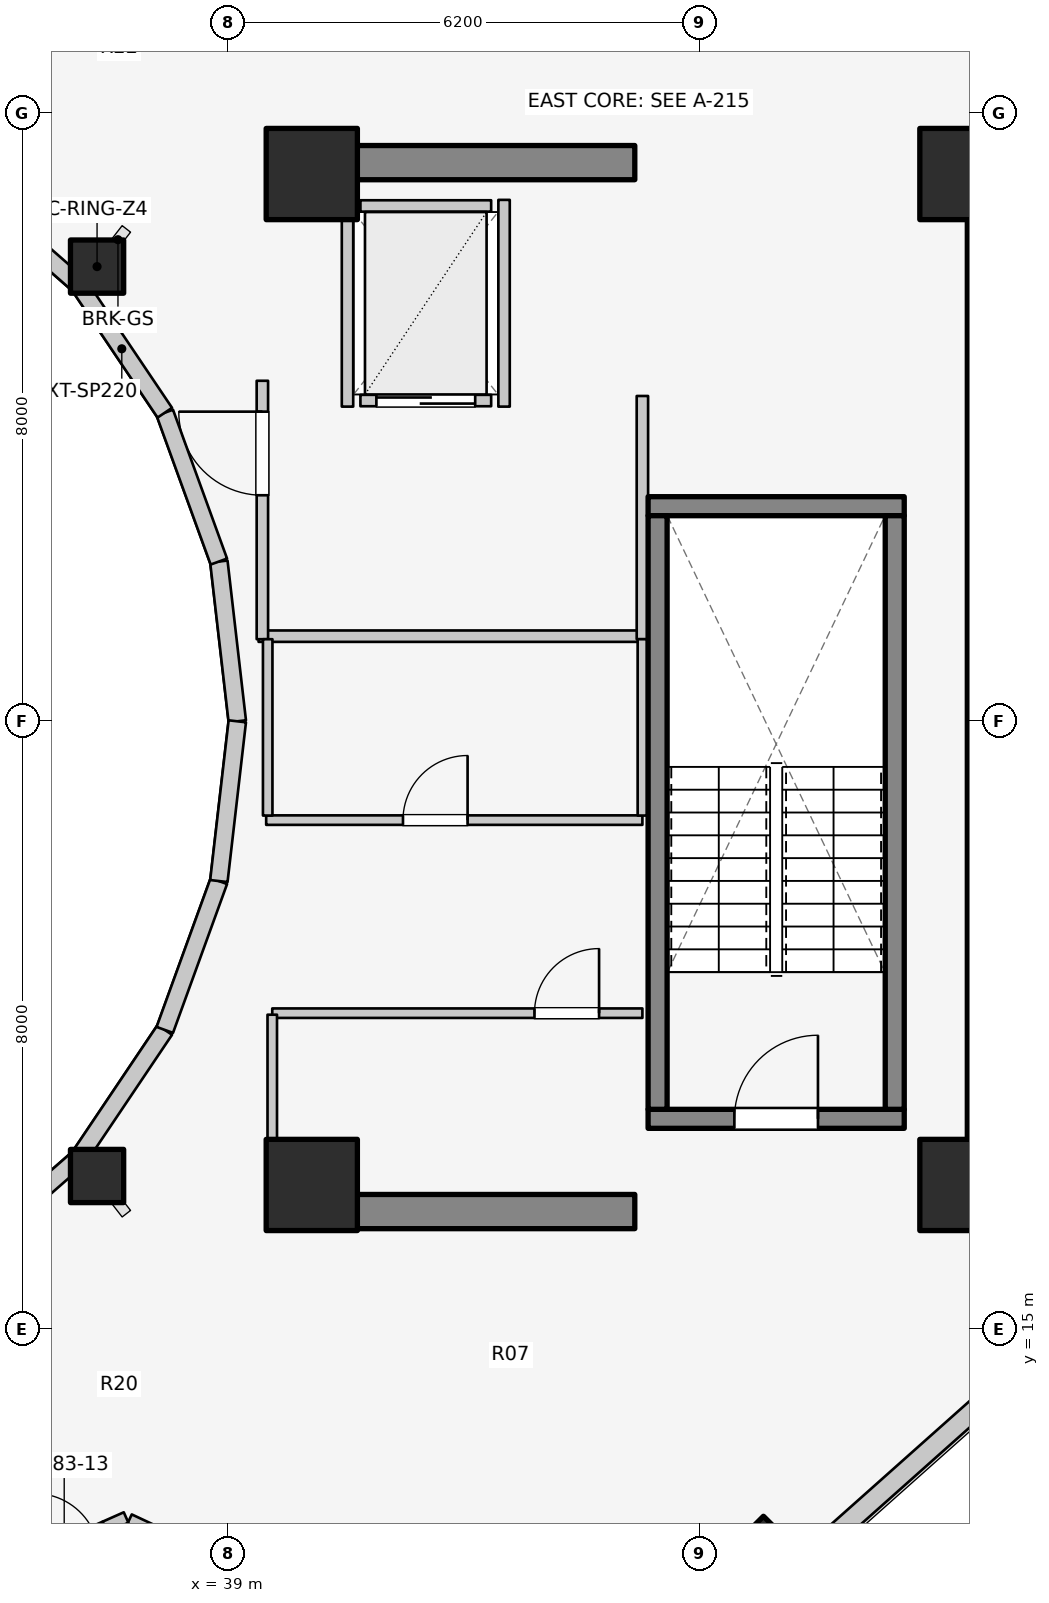
"""IFC4 building model, lengths in metres.
Left out: names, types, materials, properties, quantities, classifications, styles, units other than length and angle.
Written with IfcOpenShell. Run it as: python <this file> out.ifc"""

import sys

from ifc_helpers import new_model, si_unit, direction, frame, frame_2d, origin, origin_2d, place, context, subcontext, project, spatial, rectangle, i_section, extrude, element, fill, save


model = new_model("IFC4")
c1 = context("Model", 3, precision=1e-05, world=origin(), true_north=direction((0.0, 1.0)))
c2 = subcontext(c1, "Body", "Model", "MODEL_VIEW")
j1 = project(units=[si_unit("LENGTHUNIT", "METRE"), si_unit("PLANEANGLEUNIT", "RADIAN")], contexts=[c1])
p1 = place(None, origin())
s1 = spatial("IfcSite", under=j1, at=p1, CompositionType="ELEMENT")
p2 = place(p1, origin())
s2 = spatial("IfcBuilding", under=s1, at=p2, CompositionType="ELEMENT")
p3 = place(p2, frame((0.0, 0.0, 273.2)))
s3 = spatial("IfcBuildingStorey", under=s2, at=p3, CompositionType="ELEMENT", Elevation=273.2)
p4 = place(p3, frame((48.95, 17.05, 0.0), z_axis=(0.0, 0.0, 1.0), x_axis=(0.0, 1.0, 0.0)))
e1 = element("IfcWall", 1, at=p4, inside=s3, PredefinedType="SHEAR", context=c2, shape_type="SweptSolid", body=[
    extrude(rectangle(XDim=12.8, YDim=0.45, at=frame_2d((6.4, 0.0))), origin(), (0.0, 0.0, 1.0), 3.2),
])
for number, where, z_axis, x_axis in (
    (2, (39.85, 16.55, 0.0), (0.0, 0.0, 1.0), (1.0, 0.0, 0.0)),
    (3, (39.85, 30.35, 0.0), (0.0, 0.0, 1.0), (1.0, 0.0, 0.0)),
):
    element("IfcWall", number, at=place(p3, frame(where, z_axis=z_axis, x_axis=x_axis)), inside=s3, PredefinedType="SHEAR", context=c2, shape_type="SweptSolid", body=[
        extrude(rectangle(XDim=4.5, YDim=0.45, at=frame_2d((2.25, 0.0))), origin(), (0.0, 0.0, 1.0), 3.2),
    ])
p5 = place(p3, frame((44.525, 17.77, 0.0), z_axis=(0.0, 0.0, 1.0), x_axis=(1.0, 0.0, 0.0)))
e4 = element("IfcWall", 4, at=p5, inside=s3, PredefinedType="SOLIDWALL", context=c2, shape_type="SweptSolid", body=[
    extrude(rectangle(XDim=3.37, YDim=0.25, at=frame_2d((1.685, 0.0))), origin(), (0.0, 0.0, 1.0), 3.2),
])
p6 = place(p5, frame((1.135, 0.0, 0.0)))
e5 = element("IfcOpeningElement", 5, at=p6, cuts=e4, PredefinedType="OPENING", context=c2, shape_type="SweptSolid", body=[
    extrude(rectangle(XDim=1.1, YDim=2.1, at=frame_2d((0.55, 1.05))), frame((0.0, 0.135, 0.0), z_axis=(0.0, -1.0, 0.0), x_axis=(1.0, 0.0, 0.0)), (0.0, 0.0, 1.0), 0.27),
])
p7 = place(p3, frame((44.525, 25.83, 0.0), z_axis=(0.0, 0.0, 1.0), x_axis=(1.0, 0.0, 0.0)))
e6 = element("IfcWall", 6, at=p7, inside=s3, PredefinedType="SOLIDWALL", context=c2, shape_type="SweptSolid", body=[
    extrude(rectangle(XDim=3.37, YDim=0.25, at=frame_2d((1.685, 0.0))), origin(), (0.0, 0.0, 1.0), 3.2),
])
for number, where, z_axis, x_axis in (
    (7, (44.65, 17.895, 0.0), (0.0, 0.0, 1.0), (0.0, 1.0, 0.0)),
    (8, (47.77, 17.895, 0.0), (0.0, 0.0, 1.0), (0.0, 1.0, 0.0)),
):
    element("IfcWall", number, at=place(p3, frame(where, z_axis=z_axis, x_axis=x_axis)), inside=s3, PredefinedType="SOLIDWALL", context=c2, shape_type="SweptSolid", body=[
        extrude(rectangle(XDim=7.81, YDim=0.25, at=frame_2d((3.905, 0.0))), origin(), (0.0, 0.0, 1.0), 3.2),
    ])
for number, where, z_axis, x_axis in (
    (9, (40.1, 16.9, 0.0), (0.0, 0.0, 1.0), (1.0, 0.0, 0.0)),
    (10, (48.7, 16.9, 0.0), (0.0, 0.0, 1.0), (1.0, 0.0, 0.0)),
    (11, (48.7, 30.2, 0.0), (0.0, 0.0, 1.0), (1.0, 0.0, 0.0)),
    (12, (40.1, 30.2, 0.0), (0.0, 0.0, 1.0), (1.0, 0.0, 0.0)),
):
    element("IfcColumn", number, at=place(p3, frame(where, z_axis=z_axis, x_axis=x_axis)), inside=s3, PredefinedType="COLUMN", context=c2, shape_type="SweptSolid", body=[
        extrude(rectangle(XDim=1.2, YDim=1.2, at=origin_2d()), origin(), (0.0, 0.0, 1.0), 3.2),
    ])
for number, where, z_axis, x_axis in (
    (13, (37.275, 28.982, 0.0), (0.0, 0.0, 1.0), (1.0, 0.0, 0.0)),
    (14, (37.275, 17.018, 0.0), (0.0, 0.0, 1.0), (1.0, 0.0, 0.0)),
):
    element("IfcColumn", number, at=place(p3, frame(where, z_axis=z_axis, x_axis=x_axis)), inside=s3, PredefinedType="COLUMN", context=c2, shape_type="SweptSolid", body=[
        extrude(rectangle(XDim=0.7, YDim=0.7, at=origin_2d()), origin(), (0.0, 0.0, 1.0), 3.2),
    ])
p8 = place(p3, frame((46.035, 12.242, 0.0), z_axis=(0.0, 0.0, 1.0), x_axis=(0.707106781187, -0.707106781187, 0.0)))
e15 = element("IfcColumn", 15, at=p8, inside=s3, PredefinedType="COLUMN", context=c2, shape_type="SweptSolid", body=[
    extrude(i_section(OverallWidth=0.412, OverallDepth=0.435, WebThickness=0.036, FlangeThickness=0.057, FilletRadius=0.025, at=origin_2d()), origin(), (0.0, 0.0, 1.0), 3.2),
])
p9 = place(p3, frame((39.12, 23.0, 0.0), z_axis=(0.0, 0.0, 1.0), x_axis=(-0.114711713601, 0.993398823617, 0.0)))
e16 = element("IfcWall", 16, at=p9, inside=s3, PredefinedType="STANDARD", context=c2, shape_type="SweptSolid", body=[
    extrude(rectangle(XDim=2.115, YDim=0.23, at=frame_2d((1.058, 0.0))), origin(), (0.0, 0.0, 1.0), 2.9),
])
p10 = place(p3, frame((38.877, 25.102, 0.0), z_axis=(0.0, 0.0, 1.0), x_axis=(-0.341423187295, 0.93990968033, 0.0)))
e17 = element("IfcWall", 17, at=p10, inside=s3, PredefinedType="STANDARD", context=c2, shape_type="SweptSolid", body=[
    extrude(rectangle(XDim=2.084, YDim=0.23, at=frame_2d((1.042, 0.0))), origin(), (0.0, 0.0, 1.0), 2.9),
])
p11 = place(p3, frame((38.166, 27.06, 0.0), z_axis=(0.0, 0.0, 1.0), x_axis=(-0.558197800898, 0.829707909492, 0.0)))
e18 = element("IfcWall", 18, at=p11, inside=s3, PredefinedType="STANDARD", context=c2, shape_type="SweptSolid", body=[
    extrude(rectangle(XDim=2.027, YDim=0.23, at=frame_2d((1.013, 0.0))), origin(), (0.0, 0.0, 1.0), 1.32),
])
for number, where, z_axis, x_axis in (
    (19, (37.035, 28.742, 0.0), (0.0, 0.0, 1.0), (-0.753, 0.659, 0.0)),
    (20, (35.56, 15.968, 0.0), (0.0, 0.0, 1.0), (0.753, 0.659, 0.0)),
):
    element("IfcWall", number, at=place(p3, frame(where, z_axis=z_axis, x_axis=x_axis)), inside=s3, PredefinedType="STANDARD", context=c2, shape_type="SweptSolid", body=[
        extrude(rectangle(XDim=1.959, YDim=0.23, at=frame_2d((0.98, 0.0))), origin(), (0.0, 0.0, 1.0), 1.32),
    ])
p12 = place(p3, frame((37.035, 17.258, 0.0), z_axis=(0.0, 0.0, 1.0), x_axis=(0.558197800898, 0.829707909492, 0.0)))
e21 = element("IfcWall", 21, at=p12, inside=s3, PredefinedType="STANDARD", context=c2, shape_type="SweptSolid", body=[
    extrude(rectangle(XDim=2.027, YDim=0.23, at=frame_2d((1.013, 0.0))), origin(), (0.0, 0.0, 1.0), 1.32),
])
p13 = place(p3, frame((38.166, 18.94, 0.0), z_axis=(0.0, 0.0, 1.0), x_axis=(0.341423187295, 0.93990968033, 0.0)))
e22 = element("IfcWall", 22, at=p13, inside=s3, PredefinedType="STANDARD", context=c2, shape_type="SweptSolid", body=[
    extrude(rectangle(XDim=2.084, YDim=0.23, at=frame_2d((1.042, 0.0))), origin(), (0.0, 0.0, 1.0), 2.9),
])
p14 = place(p3, frame((38.877, 20.898, 0.0), z_axis=(0.0, 0.0, 1.0), x_axis=(0.114711713601, 0.993398823617, 0.0)))
e23 = element("IfcWall", 23, at=p14, inside=s3, PredefinedType="STANDARD", context=c2, shape_type="SweptSolid", body=[
    extrude(rectangle(XDim=2.115, YDim=0.23, at=frame_2d((1.058, 0.0))), origin(), (0.0, 0.0, 1.0), 2.9),
])
p15 = place(p3, frame((46.448, 11.829, 0.0), z_axis=(0.0, 0.0, 1.0), x_axis=(0.746928837667, 0.664903986649, 0.0)))
e24 = element("IfcWall", 24, at=p15, inside=s3, PredefinedType="STANDARD", context=c2, shape_type="SweptSolid", body=[
    extrude(rectangle(XDim=3.982, YDim=0.26, at=frame_2d((1.991, 0.0))), origin(), (0.0, 0.0, 1.0), 1.32),
])
p16 = place(p3, frame((40.74, 27.22, 0.0), z_axis=(0.0, 0.0, 1.0), x_axis=(1.0, 0.0, 0.0)))
e25 = element("IfcWall", 25, at=p16, inside=s3, PredefinedType="SOLIDWALL", context=c2, shape_type="SweptSolid", body=[
    extrude(rectangle(XDim=1.72, YDim=0.15, at=frame_2d((0.86, 0.0))), origin(), (0.0, 0.0, 1.0), 2.915),
])
p17 = place(p16, frame((0.21, 0.0, 0.0)))
e26 = element("IfcOpeningElement", 26, at=p17, cuts=e25, PredefinedType="OPENING", context=c2, shape_type="SweptSolid", body=[
    extrude(rectangle(XDim=1.3, YDim=2.1, at=frame_2d((0.65, 1.05))), frame((0.0, 0.085, 0.0), z_axis=(0.0, -1.0, 0.0), x_axis=(1.0, 0.0, 0.0)), (0.0, 0.0, 1.0), 0.17),
])
p18 = place(p3, frame((40.74, 29.78, 0.0), z_axis=(0.0, 0.0, 1.0), x_axis=(1.0, 0.0, 0.0)))
e27 = element("IfcWall", 27, at=p18, inside=s3, PredefinedType="SOLIDWALL", context=c2, shape_type="SweptSolid", body=[
    extrude(rectangle(XDim=1.72, YDim=0.15, at=frame_2d((0.86, 0.0))), origin(), (0.0, 0.0, 1.0), 2.915),
])
for number, where, z_axis, x_axis in (
    (28, (40.57, 27.14, 0.0), (0.0, 0.0, 1.0), (0.0, 1.0, 0.0)),
    (29, (42.63, 27.14, 0.0), (0.0, 0.0, 1.0), (0.0, 1.0, 0.0)),
):
    element("IfcWall", number, at=place(p3, frame(where, z_axis=z_axis, x_axis=x_axis)), inside=s3, PredefinedType="SOLIDWALL", context=c2, shape_type="SweptSolid", body=[
        extrude(rectangle(XDim=2.72, YDim=0.15, at=frame_2d((1.36, 0.0))), origin(), (0.0, 0.0, 1.0), 2.915),
    ])
p19 = place(p3, frame((39.4, 24.12, 0.0), z_axis=(0.0, 0.0, 1.0), x_axis=(1.0, 0.0, 0.0)))
e30 = element("IfcWall", 30, at=p19, inside=s3, PredefinedType="PARTITIONING", context=c2, shape_type="SweptSolid", body=[
    extrude(rectangle(XDim=5.08, YDim=0.15, at=frame_2d((2.54, 0.0))), origin(), (0.0, 0.0, 1.0), 2.22),
])
p20 = place(p3, frame((44.45, 24.08, 0.0), z_axis=(0.0, 0.0, 1.0), x_axis=(0.0, 1.0, 0.0)))
e31 = element("IfcWall", 31, at=p20, inside=s3, PredefinedType="PARTITIONING", context=c2, shape_type="SweptSolid", body=[
    extrude(rectangle(XDim=3.2, YDim=0.15, at=frame_2d((1.6, 0.0))), origin(), (0.0, 0.0, 1.0), 2.915),
])
p21 = place(p3, frame((39.45, 24.08, 0.0), z_axis=(0.0, 0.0, 1.0), x_axis=(0.0, 1.0, 0.0)))
e32 = element("IfcWall", 32, at=p21, inside=s3, PredefinedType="PARTITIONING", context=c2, shape_type="SweptSolid", body=[
    extrude(rectangle(XDim=3.4, YDim=0.15, at=frame_2d((1.7, 0.0))), origin(), (0.0, 0.0, 1.0), 2.915),
])
p22 = place(p21, frame((1.894, 0.0, 0.0)))
e33 = element("IfcOpeningElement", 33, at=p22, cuts=e32, PredefinedType="OPENING", context=c2, shape_type="SweptSolid", body=[
    extrude(rectangle(XDim=1.1, YDim=2.1, at=frame_2d((0.55, 1.05))), frame((0.0, 0.085, 0.0), z_axis=(0.0, -1.0, 0.0), x_axis=(1.0, 0.0, 0.0)), (0.0, 0.0, 1.0), 0.17),
])
p23 = place(p3, frame((39.58, 19.16, 0.0), z_axis=(0.0, 0.0, 1.0), x_axis=(1.0, 0.0, 0.0)))
e34 = element("IfcWall", 34, at=p23, inside=s3, PredefinedType="PARTITIONING", context=c2, shape_type="SweptSolid", body=[
    extrude(rectangle(XDim=4.87, YDim=0.125, at=frame_2d((2.435, 0.0))), origin(), (0.0, 0.0, 1.0), 2.22),
])
p24 = place(p23, frame((3.45, 0.0, 0.0)))
e35 = element("IfcOpeningElement", 35, at=p24, cuts=e34, PredefinedType="OPENING", context=c2, shape_type="SweptSolid", body=[
    extrude(rectangle(XDim=0.85, YDim=2.05, at=frame_2d((0.425, 1.025))), frame((0.0, 0.073, 0.0), z_axis=(0.0, -1.0, 0.0), x_axis=(1.0, 0.0, 0.0)), (0.0, 0.0, 1.0), 0.145),
])
p25 = place(p3, frame((39.58, 17.1, 0.0), z_axis=(0.0, 0.0, 1.0), x_axis=(0.0, 1.0, 0.0)))
e36 = element("IfcWall", 36, at=p25, inside=s3, PredefinedType="PARTITIONING", context=c2, shape_type="SweptSolid", body=[
    extrude(rectangle(XDim=2.04, YDim=0.125, at=frame_2d((1.02, 0.0))), origin(), (0.0, 0.0, 1.0), 2.491),
])
p26 = place(p3, frame((39.5, 21.7, 0.0), z_axis=(0.0, 0.0, 1.0), x_axis=(1.0, 0.0, 0.0)))
e37 = element("IfcWall", 37, at=p26, inside=s3, PredefinedType="PARTITIONING", context=c2, shape_type="SweptSolid", body=[
    extrude(rectangle(XDim=4.95, YDim=0.125, at=frame_2d((2.475, 0.0))), origin(), (0.0, 0.0, 1.0), 2.22),
])
p27 = place(p26, frame((1.8, 0.0, 0.0)))
e38 = element("IfcOpeningElement", 38, at=p27, cuts=e37, PredefinedType="OPENING", context=c2, shape_type="SweptSolid", body=[
    extrude(rectangle(XDim=0.85, YDim=2.05, at=frame_2d((0.425, 1.025))), frame((0.0, 0.073, 0.0), z_axis=(0.0, -1.0, 0.0), x_axis=(1.0, 0.0, 0.0)), (0.0, 0.0, 1.0), 0.145),
])
for number, where, z_axis, x_axis in (
    (39, (39.52, 21.76, 0.0), (0.0, 0.0, 1.0), (0.0, 1.0, 0.0)),
    (40, (44.45, 21.76, 0.0), (0.0, 0.0, 1.0), (0.0, 1.0, 0.0)),
):
    element("IfcWall", number, at=place(p3, frame(where, z_axis=z_axis, x_axis=x_axis)), inside=s3, PredefinedType="PARTITIONING", context=c2, shape_type="SweptSolid", body=[
        extrude(rectangle(XDim=2.32, YDim=0.125, at=frame_2d((1.16, 0.0))), origin(), (0.0, 0.0, 1.0), 2.915),
    ])
p28 = place(p3, frame((37.7, 12.498, 0.0), z_axis=(0.0, 0.0, 1.0), x_axis=(0.90567955352, -0.423962906793, 0.0)))
e41 = element("IfcWall", 41, at=p28, inside=s3, PredefinedType="PARTITIONING", context=c2, shape_type="SweptSolid", body=[
    extrude(rectangle(XDim=5.419, YDim=0.15, at=frame_2d((2.71, 0.0))), origin(), (0.0, 0.0, 1.0), 1.32),
])
p29 = place(p3, frame((36.308, 11.927, 0.0), z_axis=(0.0, 0.0, 1.0), x_axis=(0.913940571896, 0.405848039347, 0.0)))
e42 = element("IfcWall", 42, at=p29, inside=s3, PredefinedType="PARTITIONING", context=c2, shape_type="SweptSolid", body=[
    extrude(rectangle(XDim=1.17, YDim=0.15, at=frame_2d((0.585, 0.0))), origin(), (0.0, 0.0, 1.0), 2.11),
])
p30 = place(p29, frame((0.16, 0.0, 0.0)))
e43 = element("IfcOpeningElement", 43, at=p30, cuts=e42, PredefinedType="OPENING", context=c2, shape_type="SweptSolid", body=[
    extrude(rectangle(XDim=0.85, YDim=2.05, at=frame_2d((0.425, 1.025))), frame((0.0, 0.085, 0.0), z_axis=(0.0, -1.0, 0.0), x_axis=(1.0, 0.0, 0.0)), (0.0, 0.0, 1.0), 0.17),
])
p31 = place(p3, frame((37.377, 12.401, 0.0), z_axis=(0.0, 0.0, 1.0), x_axis=(0.91394327808, 0.405841945161, 0.0)))
e44 = element("IfcWall", 44, at=p31, inside=s3, PredefinedType="PARTITIONING", context=c2, shape_type="SweptSolid", body=[
    extrude(rectangle(XDim=0.306, YDim=0.15, at=frame_2d((0.153, 0.0))), origin(), (0.0, 0.0, 1.0), 2.915),
])
p32 = place(p6, origin())
e45 = element("IfcDoor", 45, at=p32, inside=s3, OperationType="SINGLE_SWING_RIGHT", PredefinedType="DOOR", context=c2, shape_type="SweptSolid", body=[
    extrude(rectangle(XDim=1.1, YDim=2.1, at=frame_2d((0.55, 1.05))), frame((0.0, 0.025, 0.0), z_axis=(0.0, -1.0, 0.0), x_axis=(1.0, 0.0, 0.0)), (0.0, 0.0, 1.0), 0.05),
])
fill(e5, e45)
p33 = place(p17, origin())
e46 = element("IfcDoor", 46, at=p33, inside=s3, OperationType="DOUBLE_DOOR_SLIDING", PredefinedType="DOOR", context=c2, shape_type="SweptSolid", body=[
    extrude(rectangle(XDim=1.3, YDim=2.1, at=frame_2d((0.65, 1.05))), frame((0.0, 0.025, 0.0), z_axis=(0.0, -1.0, 0.0), x_axis=(1.0, 0.0, 0.0)), (0.0, 0.0, 1.0), 0.05),
])
fill(e26, e46)
p34 = place(p22, origin())
e47 = element("IfcDoor", 47, at=p34, inside=s3, OperationType="SINGLE_SWING_RIGHT", PredefinedType="DOOR", context=c2, shape_type="SweptSolid", body=[
    extrude(rectangle(XDim=1.1, YDim=2.1, at=frame_2d((0.55, 1.05))), frame((0.0, 0.025, 0.0), z_axis=(0.0, -1.0, 0.0), x_axis=(1.0, 0.0, 0.0)), (0.0, 0.0, 1.0), 0.05),
])
fill(e33, e47)
p35 = place(p24, origin())
e48 = element("IfcDoor", 48, at=p35, inside=s3, OperationType="SINGLE_SWING_RIGHT", PredefinedType="DOOR", context=c2, shape_type="SweptSolid", body=[
    extrude(rectangle(XDim=0.85, YDim=2.05, at=frame_2d((0.425, 1.025))), frame((0.0, 0.025, 0.0), z_axis=(0.0, -1.0, 0.0), x_axis=(1.0, 0.0, 0.0)), (0.0, 0.0, 1.0), 0.05),
])
fill(e35, e48)
p36 = place(p27, origin())
e49 = element("IfcDoor", 49, at=p36, inside=s3, OperationType="SINGLE_SWING_RIGHT", PredefinedType="DOOR", context=c2, shape_type="SweptSolid", body=[
    extrude(rectangle(XDim=0.85, YDim=2.05, at=frame_2d((0.425, 1.025))), frame((0.0, 0.025, 0.0), z_axis=(0.0, -1.0, 0.0), x_axis=(1.0, 0.0, 0.0)), (0.0, 0.0, 1.0), 0.05),
])
fill(e38, e49)
save(model, sys.argv[1])
